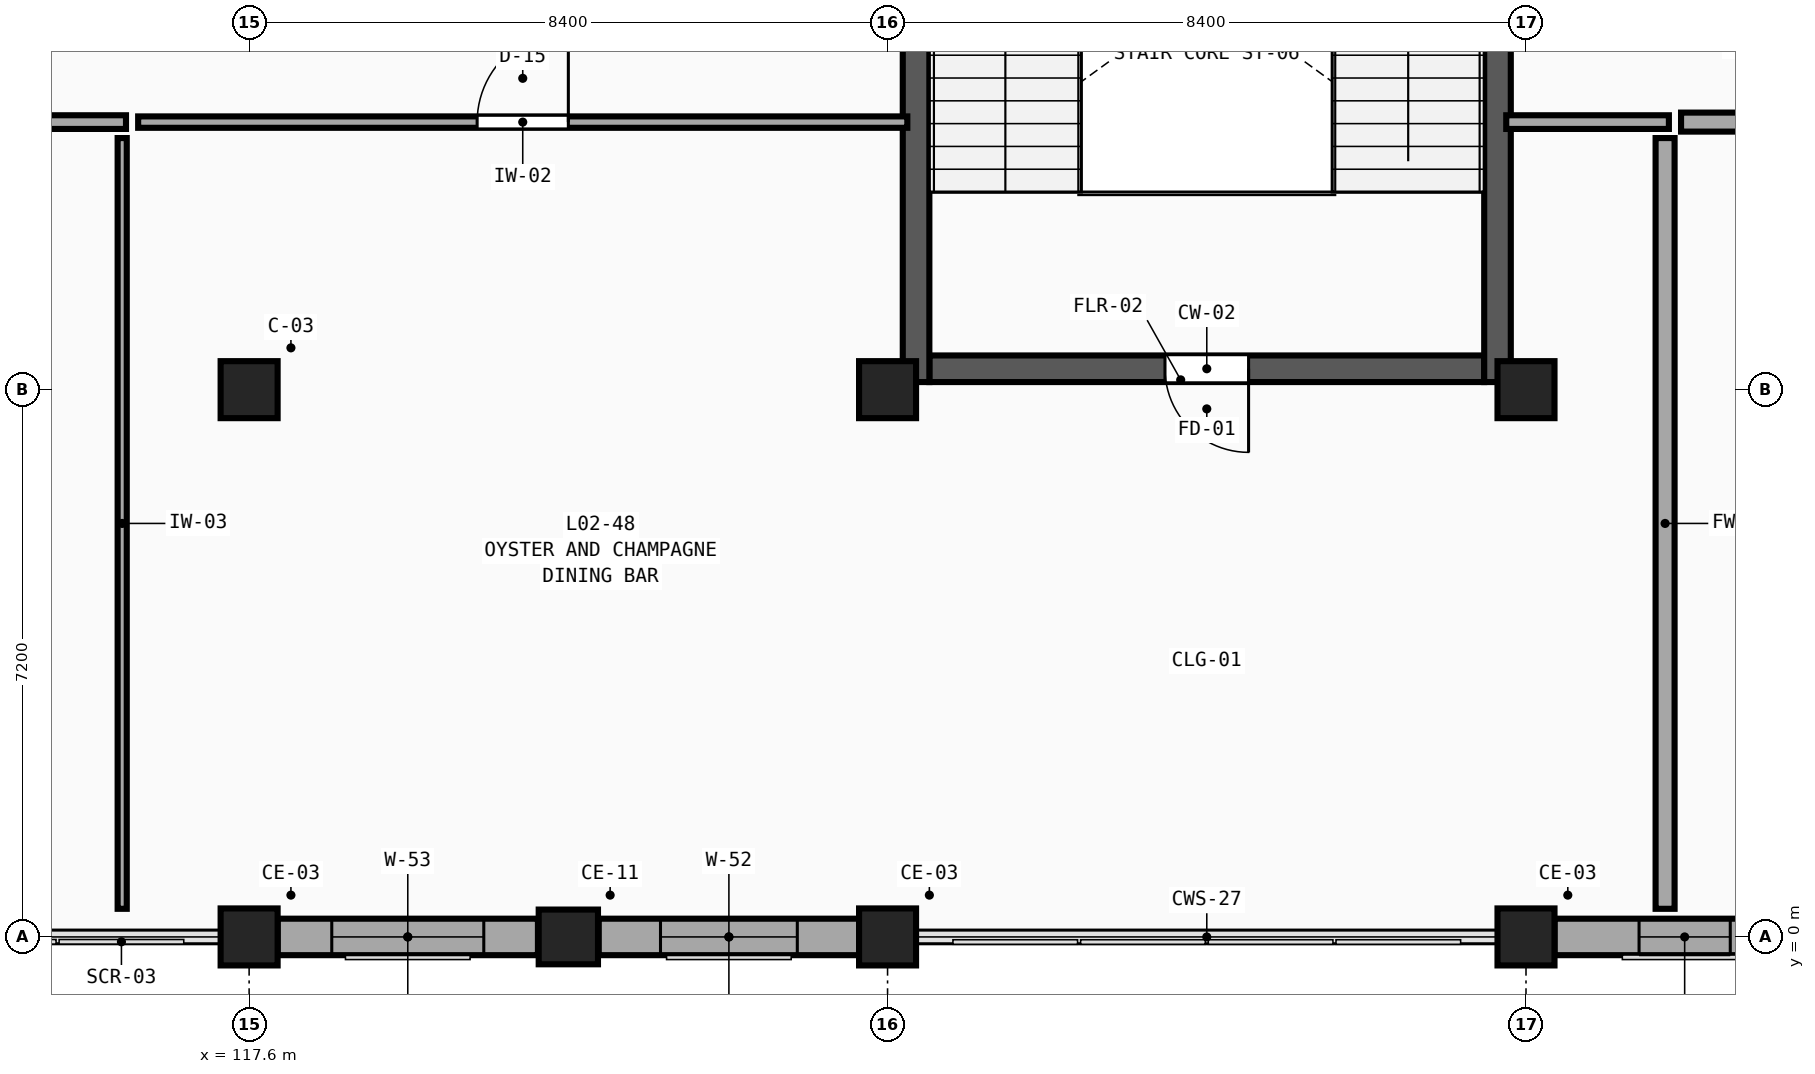
"""IFC4 building model, lengths in metres.
Left out: names, types, materials, properties, quantities, classifications, styles, units other than length and angle.
Written with IfcOpenShell. Run it as: python <this file> out.ifc"""

import sys

from ifc_helpers import new_model, si_unit, direction, frame, frame_2d, origin, origin_2d, place, context, subcontext, project, spatial, rectangle, extrude, element, fill, save


model = new_model("IFC4")
c1 = context("Model", 3, precision=1e-05, world=origin(), true_north=direction((0.0, 1.0)))
c2 = subcontext(c1, "Body", "Model", "MODEL_VIEW")
j1 = project(units=[si_unit("LENGTHUNIT", "METRE"), si_unit("PLANEANGLEUNIT", "RADIAN")], contexts=[c1])
p1 = place(None, origin())
s1 = spatial("IfcSite", under=j1, at=p1, CompositionType="ELEMENT")
p2 = place(p1, origin())
s2 = spatial("IfcBuilding", under=s1, at=p2, CompositionType="ELEMENT")
p3 = place(p2, frame((0.0, 0.0, 9.9)))
s3 = spatial("IfcBuildingStorey", under=s2, at=p3, CompositionType="ELEMENT", Elevation=9.9)
for number, where, z_axis, x_axis in (
    (1, (117.6, 0.0, 0.0), (0.0, 0.0, 1.0), (1.0, 0.0, 0.0)),
    (2, (117.6, 7.2, 0.0), (0.0, 0.0, 1.0), (1.0, 0.0, 0.0)),
    (3, (126.0, 0.0, 0.0), (0.0, 0.0, 1.0), (1.0, 0.0, 0.0)),
    (4, (126.0, 7.2, 0.0), (0.0, 0.0, 1.0), (1.0, 0.0, 0.0)),
    (5, (134.4, 0.0, 0.0), (0.0, 0.0, 1.0), (1.0, 0.0, 0.0)),
    (6, (134.4, 7.2, 0.0), (0.0, 0.0, 1.0), (1.0, 0.0, 0.0)),
):
    element("IfcColumn", number, at=place(p3, frame(where, z_axis=z_axis, x_axis=x_axis)), inside=s3, PredefinedType="COLUMN", context=c2, shape_type="SweptSolid", body=[
        extrude(rectangle(XDim=0.75, YDim=0.75, at=origin_2d()), origin(), (0.0, 0.0, 1.0), 4.5),
    ])
p4 = place(p3, frame((121.8, 0.0, 0.0), z_axis=(0.0, 0.0, 1.0), x_axis=(1.0, 0.0, 0.0)))
e7 = element("IfcColumn", 7, at=p4, inside=s3, PredefinedType="PILASTER", context=c2, shape_type="SweptSolid", body=[
    extrude(rectangle(XDim=0.78, YDim=0.72, at=origin_2d()), origin(), (0.0, 0.0, 1.0), 4.5),
])
p5 = place(p3, frame((125.625, 0.0, 0.0), z_axis=(0.0, 0.0, 1.0), x_axis=(-1.0, 0.0, 0.0)))
e8 = element("IfcWall", 8, at=p5, inside=s3, PredefinedType="SOLIDWALL", context=c2, shape_type="SweptSolid", body=[
    extrude(rectangle(XDim=3.425, YDim=0.48, at=frame_2d((1.712, 0.0))), origin(), (0.0, 0.0, 1.0), 3.63),
])
p6 = place(p5, frame((0.812, 0.0, 0.75)))
e9 = element("IfcOpeningElement", 9, at=p6, cuts=e8, PredefinedType="OPENING", context=c2, shape_type="SweptSolid", body=[
    extrude(rectangle(XDim=1.8, YDim=2.73, at=frame_2d((0.9, 1.365))), frame((0.0, 0.26, 0.0), z_axis=(0.0, -1.0, 0.0), x_axis=(1.0, 0.0, 0.0)), (0.0, 0.0, 1.0), 0.52),
])
p7 = place(p3, frame((121.4, 0.0, 0.0), z_axis=(0.0, 0.0, 1.0), x_axis=(-1.0, 0.0, 0.0)))
e10 = element("IfcWall", 10, at=p7, inside=s3, PredefinedType="SOLIDWALL", context=c2, shape_type="SweptSolid", body=[
    extrude(rectangle(XDim=3.425, YDim=0.48, at=frame_2d((1.712, 0.0))), origin(), (0.0, 0.0, 1.0), 3.63),
])
p8 = place(p7, frame((0.712, 0.0, 0.75)))
e11 = element("IfcOpeningElement", 11, at=p8, cuts=e10, PredefinedType="OPENING", context=c2, shape_type="SweptSolid", body=[
    extrude(rectangle(XDim=2.0, YDim=2.73, at=frame_2d((1.0, 1.365))), frame((0.0, 0.26, 0.0), z_axis=(0.0, -1.0, 0.0), x_axis=(1.0, 0.0, 0.0)), (0.0, 0.0, 1.0), 0.52),
])
p9 = place(p3, frame((138.2, 0.0, 0.0), z_axis=(0.0, 0.0, 1.0), x_axis=(-1.0, 0.0, 0.0)))
e12 = element("IfcWall", 12, at=p9, inside=s3, PredefinedType="SOLIDWALL", context=c2, shape_type="SweptSolid", body=[
    extrude(rectangle(XDim=3.425, YDim=0.48, at=frame_2d((1.712, 0.0))), origin(), (0.0, 0.0, 1.0), 3.63),
])
p10 = place(p9, frame((1.113, 0.0, 0.75)))
e13 = element("IfcOpeningElement", 13, at=p10, cuts=e12, PredefinedType="OPENING", context=c2, shape_type="SweptSolid", body=[
    extrude(rectangle(XDim=1.2, YDim=1.9, at=frame_2d((0.6, 0.95))), frame((0.0, 0.26, 0.0), z_axis=(0.0, -1.0, 0.0), x_axis=(1.0, 0.0, 0.0)), (0.0, 0.0, 1.0), 0.52),
])
p11 = place(p3, frame((133.85, 7.475, 0.0), z_axis=(0.0, 0.0, 1.0), x_axis=(-1.0, 0.0, 0.0)))
e14 = element("IfcWall", 14, at=p11, inside=s3, PredefinedType="SHEAR", context=c2, shape_type="SweptSolid", body=[
    extrude(rectangle(XDim=7.3, YDim=0.35, at=frame_2d((3.65, 0.0))), origin(), (0.0, 0.0, 1.0), 4.5),
])
p12 = place(p11, frame((3.1, 0.0, 0.0)))
e15 = element("IfcOpeningElement", 15, at=p12, cuts=e14, PredefinedType="OPENING", context=c2, shape_type="SweptSolid", body=[
    extrude(rectangle(XDim=1.1, YDim=2.2, at=frame_2d((0.55, 1.1))), frame((0.0, 0.195, 0.0), z_axis=(0.0, -1.0, 0.0), x_axis=(1.0, 0.0, 0.0)), (0.0, 0.0, 1.0), 0.39),
])
for number, where, z_axis, x_axis in (
    (16, (126.375, 15.45, 0.0), (0.0, 0.0, 1.0), (0.0, -1.0, 0.0)),
    (17, (134.025, 7.3, 0.0), (0.0, 0.0, 1.0), (0.0, 1.0, 0.0)),
):
    element("IfcWall", number, at=place(p3, frame(where, z_axis=z_axis, x_axis=x_axis)), inside=s3, PredefinedType="SHEAR", context=c2, shape_type="SweptSolid", body=[
        extrude(rectangle(XDim=8.15, YDim=0.35, at=frame_2d((4.075, 0.0))), origin(), (0.0, 0.0, 1.0), 4.5),
    ])
p13 = place(p3, frame((136.44, 10.72, 0.0), z_axis=(0.0, 0.0, 1.0), x_axis=(1.0, 0.0, 0.0)))
e18 = element("IfcWall", 18, at=p13, inside=s3, PredefinedType="SOLIDWALL", context=c2, shape_type="SweptSolid", body=[
    extrude(rectangle(XDim=14.03, YDim=0.25, at=frame_2d((7.015, 0.0))), origin(), (0.0, 0.0, 1.0), 4.18),
])
p14 = place(p13, frame((6.115, 0.0, 0.0)))
e19 = element("IfcOpeningElement", 19, at=p14, cuts=e18, PredefinedType="OPENING", context=c2, shape_type="SweptSolid", body=[
    extrude(rectangle(XDim=1.8, YDim=2.3, at=frame_2d((0.9, 1.15))), frame((0.0, 0.145, 0.0), z_axis=(0.0, -1.0, 0.0), x_axis=(1.0, 0.0, 0.0)), (0.0, 0.0, 1.0), 0.29),
])
p15 = place(p3, frame((116.14, 10.72, 0.0), z_axis=(0.0, 0.0, 1.0), x_axis=(1.0, 0.0, 0.0)))
e20 = element("IfcWall", 20, at=p15, inside=s3, PredefinedType="PARTITIONING", context=c2, shape_type="SweptSolid", body=[
    extrude(rectangle(XDim=10.12, YDim=0.15, at=frame_2d((5.06, 0.0))), origin(), (0.0, 0.0, 1.0), 4.18),
])
p16 = place(p15, frame((4.46, 0.0, 0.0)))
e21 = element("IfcOpeningElement", 21, at=p16, cuts=e20, PredefinedType="OPENING", context=c2, shape_type="SweptSolid", body=[
    extrude(rectangle(XDim=1.2, YDim=2.21, at=frame_2d((0.6, 1.105))), frame((0.0, 0.095, 0.0), z_axis=(0.0, -1.0, 0.0), x_axis=(1.0, 0.0, 0.0)), (0.0, 0.0, 1.0), 0.19),
])
p17 = place(p3, frame((108.74, 10.72, 0.0), z_axis=(0.0, 0.0, 1.0), x_axis=(1.0, 0.0, 0.0)))
e22 = element("IfcWall", 22, at=p17, inside=s3, PredefinedType="PARTITIONING", context=c2, shape_type="SweptSolid", body=[
    extrude(rectangle(XDim=7.24, YDim=0.18, at=frame_2d((3.62, 0.0))), origin(), (0.0, 0.0, 1.0), 4.18),
])
p18 = place(p17, frame((2.86, 0.0, 0.0)))
e23 = element("IfcOpeningElement", 23, at=p18, cuts=e22, PredefinedType="OPENING", context=c2, shape_type="SweptSolid", body=[
    extrude(rectangle(XDim=1.52, YDim=2.37, at=frame_2d((0.76, 1.185))), frame((0.0, 0.11, 0.0), z_axis=(0.0, -1.0, 0.0), x_axis=(1.0, 0.0, 0.0)), (0.0, 0.0, 1.0), 0.22),
])
p19 = place(p3, frame((134.14, 10.72, 0.0), z_axis=(0.0, 0.0, 1.0), x_axis=(1.0, 0.0, 0.0)))
e24 = element("IfcWall", 24, at=p19, inside=s3, PredefinedType="PARTITIONING", context=c2, shape_type="SweptSolid", body=[
    extrude(rectangle(XDim=2.14, YDim=0.18, at=frame_2d((1.07, 0.0))), origin(), (0.0, 0.0, 1.0), 4.18),
])
p20 = place(p3, frame((115.93, 0.37, 0.0), z_axis=(0.0, 0.0, 1.0), x_axis=(0.0, 1.0, 0.0)))
e25 = element("IfcWall", 25, at=p20, inside=s3, PredefinedType="PARTITIONING", context=c2, shape_type="SweptSolid", body=[
    extrude(rectangle(XDim=10.14, YDim=0.12, at=frame_2d((5.07, 0.0))), origin(), (0.0, 0.0, 1.0), 4.18),
])
p21 = place(p3, frame((136.23, 0.37, 0.0), z_axis=(0.0, 0.0, 1.0), x_axis=(0.0, 1.0, 0.0)))
e26 = element("IfcWall", 26, at=p21, inside=s3, PredefinedType="SOLIDWALL", context=c2, shape_type="SweptSolid", body=[
    extrude(rectangle(XDim=10.14, YDim=0.25, at=frame_2d((5.07, 0.0))), origin(), (0.0, 0.0, 1.0), 4.18),
])
p22 = place(p6, origin())
e27 = element("IfcWindow", 27, at=p22, inside=s3, PartitioningType="DOUBLE_PANEL_VERTICAL", PredefinedType="WINDOW", context=c2, shape_type="SweptSolid", body=[
    extrude(rectangle(XDim=1.8, YDim=2.73, at=frame_2d((0.9, 1.365))), frame((0.0, 0.03, 0.0), z_axis=(0.0, -1.0, 0.0), x_axis=(1.0, 0.0, 0.0)), (0.0, 0.0, 1.0), 0.06),
])
fill(e9, e27)
p23 = place(p8, origin())
e28 = element("IfcWindow", 28, at=p23, inside=s3, PartitioningType="TRIPLE_PANEL_VERTICAL", PredefinedType="WINDOW", context=c2, shape_type="SweptSolid", body=[
    extrude(rectangle(XDim=2.0, YDim=2.73, at=frame_2d((1.0, 1.365))), frame((0.0, 0.03, 0.0), z_axis=(0.0, -1.0, 0.0), x_axis=(1.0, 0.0, 0.0)), (0.0, 0.0, 1.0), 0.06),
])
fill(e11, e28)
p24 = place(p10, origin())
e29 = element("IfcWindow", 29, at=p24, inside=s3, PartitioningType="SINGLE_PANEL", PredefinedType="WINDOW", context=c2, shape_type="SweptSolid", body=[
    extrude(rectangle(XDim=1.2, YDim=1.9, at=frame_2d((0.6, 0.95))), frame((0.0, 0.03, 0.0), z_axis=(0.0, -1.0, 0.0), x_axis=(1.0, 0.0, 0.0)), (0.0, 0.0, 1.0), 0.06),
])
fill(e13, e29)
p25 = place(p12, origin())
e30 = element("IfcDoor", 30, at=p25, inside=s3, OperationType="SINGLE_SWING_LEFT", PredefinedType="DOOR", context=c2, shape_type="SweptSolid", body=[
    extrude(rectangle(XDim=1.1, YDim=2.2, at=frame_2d((0.55, 1.1))), frame((0.0, 0.025, 0.0), z_axis=(0.0, -1.0, 0.0), x_axis=(1.0, 0.0, 0.0)), (0.0, 0.0, 1.0), 0.05),
])
fill(e15, e30)
p26 = place(p16, origin())
e31 = element("IfcDoor", 31, at=p26, inside=s3, OperationType="SINGLE_SWING_RIGHT", PredefinedType="DOOR", context=c2, shape_type="SweptSolid", body=[
    extrude(rectangle(XDim=1.2, YDim=2.21, at=frame_2d((0.6, 1.105))), frame((0.0, 0.025, 0.0), z_axis=(0.0, -1.0, 0.0), x_axis=(1.0, 0.0, 0.0)), (0.0, 0.0, 1.0), 0.05),
])
fill(e21, e31)
save(model, sys.argv[1])
